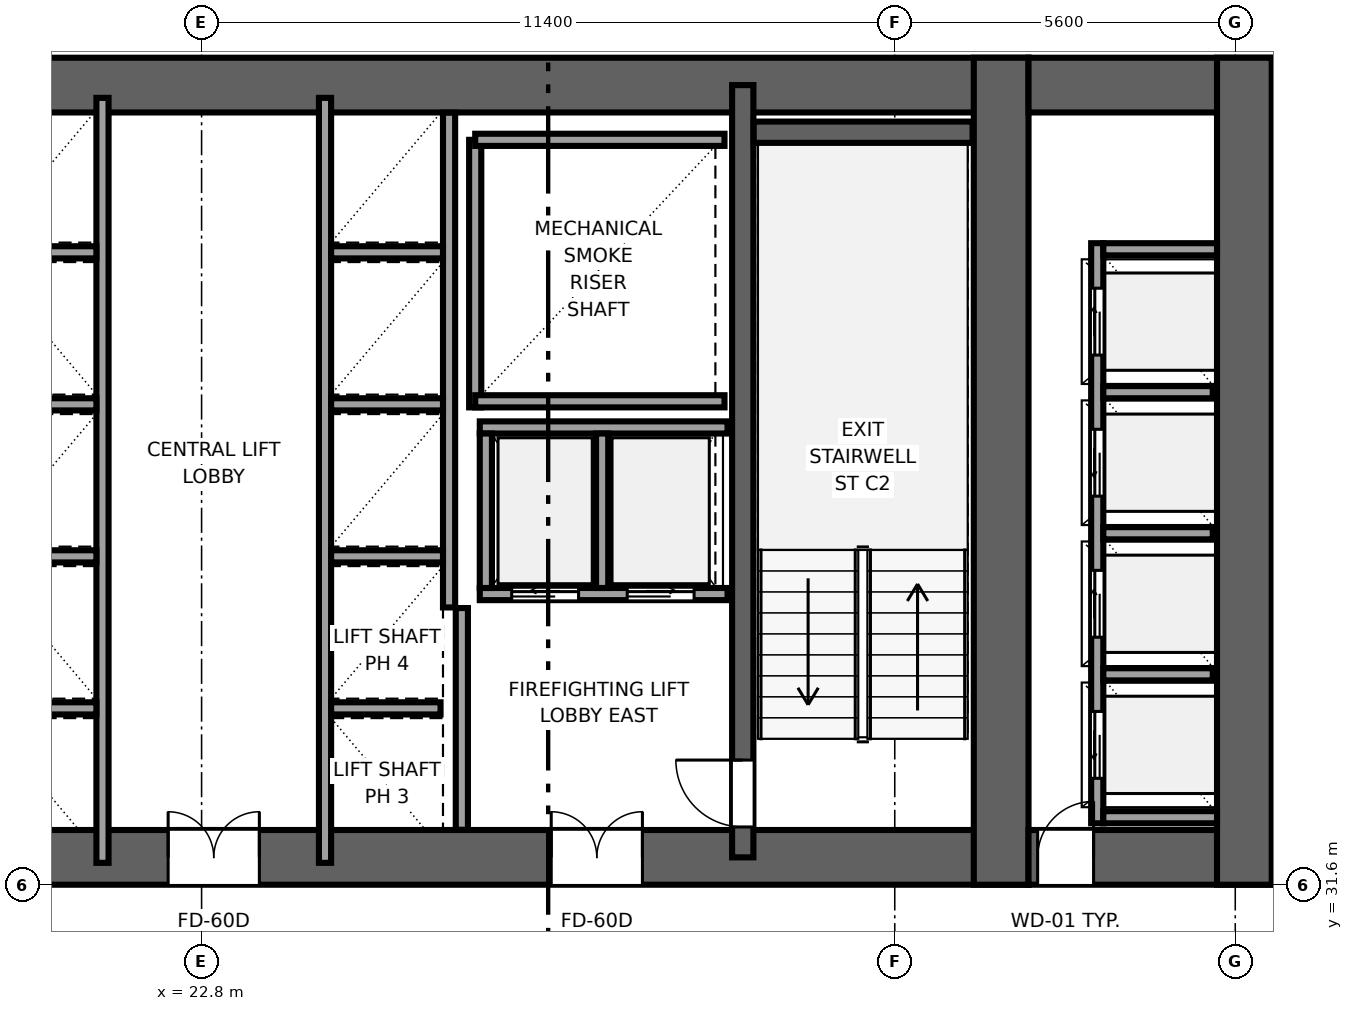
"""IFC4 building model, lengths in metres.
Left out: names, types, materials, properties, quantities, classifications, styles, units other than length and angle.
Written with IfcOpenShell. Run it as: python <this file> out.ifc"""

import sys

from ifc_helpers import new_model, si_unit, direction, frame, frame_2d, origin, place, context, subcontext, project, spatial, rectangle, extrude, source, transform, mapped, element, fill, save


model = new_model("IFC4")
c1 = context("Model", 3, precision=1e-05, world=origin(), true_north=direction((0.0, 1.0)))
c2 = subcontext(c1, "Body", "Model", "MODEL_VIEW")
j1 = project(units=[si_unit("LENGTHUNIT", "METRE"), si_unit("PLANEANGLEUNIT", "RADIAN")], contexts=[c1])
p1 = place(None, origin())
s1 = spatial("IfcSite", under=j1, at=p1, CompositionType="ELEMENT")
p2 = place(p1, origin())
s2 = spatial("IfcBuilding", under=s1, at=p2, CompositionType="ELEMENT")
p3 = place(p2, frame((0.0, 0.0, 56.85)))
s3 = spatial("IfcBuildingStorey", under=s2, at=p3, CompositionType="ELEMENT", Elevation=56.85)
p4 = place(p3, frame((9.6, 32.05, 0.0), z_axis=(0.0, 0.0, 1.0), x_axis=(1.0, 0.0, 0.0)))
e1 = element("IfcWall", 1, at=p4, inside=s3, PredefinedType="SHEAR", context=c2, shape_type="SweptSolid", body=[
    extrude(rectangle(XDim=26.8, YDim=0.9, at=frame_2d((13.4, 0.0))), origin(), (0.0, 0.0, 1.0), 3.55),
])
p5 = place(p4, frame((6.52, 0.0, 0.0), z_axis=(0.0, 0.0, 1.0), x_axis=(-1.0, 0.0, 0.0)))
e2 = element("IfcOpeningElement", 2, at=p5, cuts=e1, PredefinedType="OPENING", context=c2, shape_type="SweptSolid", body=[
    extrude(rectangle(XDim=1.5, YDim=2.04, at=frame_2d((0.75, 1.02))), frame((0.0, 0.46, 0.0), z_axis=(0.0, -1.0, 0.0), x_axis=(1.0, 0.0, 0.0)), (0.0, 0.0, 1.0), 0.92),
])
p6 = place(p4, frame((14.15, 0.0, 0.0), z_axis=(0.0, 0.0, 1.0), x_axis=(-1.0, 0.0, 0.0)))
e3 = element("IfcOpeningElement", 3, at=p6, cuts=e1, PredefinedType="OPENING", context=c2, shape_type="SweptSolid", body=[
    extrude(rectangle(XDim=1.5, YDim=2.04, at=frame_2d((0.75, 1.02))), frame((0.0, 0.46, 0.0), z_axis=(0.0, -1.0, 0.0), x_axis=(1.0, 0.0, 0.0)), (0.0, 0.0, 1.0), 0.92),
])
p7 = place(p4, frame((20.45, 0.0, 0.0), z_axis=(0.0, 0.0, 1.0), x_axis=(-1.0, 0.0, 0.0)))
e4 = element("IfcOpeningElement", 4, at=p7, cuts=e1, PredefinedType="OPENING", context=c2, shape_type="SweptSolid", body=[
    extrude(rectangle(XDim=1.5, YDim=2.04, at=frame_2d((0.75, 1.02))), frame((0.0, 0.46, 0.0), z_axis=(0.0, -1.0, 0.0), x_axis=(1.0, 0.0, 0.0)), (0.0, 0.0, 1.0), 0.92),
])
p8 = place(p4, frame((8.57, 0.0, 0.0), z_axis=(0.0, 0.0, 1.0), x_axis=(-1.0, 0.0, 0.0)))
e5 = element("IfcOpeningElement", 5, at=p8, cuts=e1, PredefinedType="OPENING", context=c2, shape_type="SweptSolid", body=[
    extrude(rectangle(XDim=0.82, YDim=2.01, at=frame_2d((0.41, 1.005))), frame((0.0, 0.46, 0.0), z_axis=(0.0, -1.0, 0.0), x_axis=(1.0, 0.0, 0.0)), (0.0, 0.0, 1.0), 0.92),
])
p9 = place(p3, frame((9.6, 44.75, 0.0), z_axis=(0.0, 0.0, 1.0), x_axis=(1.0, 0.0, 0.0)))
e6 = element("IfcWall", 6, at=p9, inside=s3, PredefinedType="SHEAR", context=c2, shape_type="SweptSolid", body=[
    extrude(rectangle(XDim=26.8, YDim=0.9, at=frame_2d((13.4, 0.0))), origin(), (0.0, 0.0, 1.0), 3.55),
])
p10 = place(p3, frame((35.95, 31.6, 0.0), z_axis=(0.0, 0.0, 1.0), x_axis=(0.0, 1.0, 0.0)))
e7 = element("IfcWall", 7, at=p10, inside=s3, PredefinedType="SHEAR", context=c2, shape_type="SweptSolid", body=[
    extrude(rectangle(XDim=13.6, YDim=0.9, at=frame_2d((6.8, 0.0))), origin(), (0.0, 0.0, 1.0), 3.55),
])
p11 = place(p3, frame((31.7, 32.05, 0.0), z_axis=(0.0, 0.0, 1.0), x_axis=(0.0, 1.0, 0.0)))
e8 = element("IfcWall", 8, at=p11, inside=s3, PredefinedType="SHEAR", context=c2, shape_type="SweptSolid", body=[
    extrude(rectangle(XDim=12.7, YDim=0.35, at=frame_2d((6.35, 0.0))), origin(), (0.0, 0.0, 1.0), 3.55),
])
p12 = place(p11, frame((1.6, 0.0, 0.0), z_axis=(0.0, 0.0, 1.0), x_axis=(-1.0, 0.0, 0.0)))
e9 = element("IfcOpeningElement", 9, at=p12, cuts=e8, PredefinedType="OPENING", context=c2, shape_type="SweptSolid", body=[
    extrude(rectangle(XDim=1.1, YDim=2.12, at=frame_2d((0.55, 1.06))), frame((0.0, 0.185, 0.0), z_axis=(0.0, -1.0, 0.0), x_axis=(1.0, 0.0, 0.0)), (0.0, 0.0, 1.0), 0.37),
])
p13 = place(p3, frame((36.4, 32.05, 0.0), z_axis=(0.0, 0.0, 1.0), x_axis=(1.0, 0.0, 0.0)))
e10 = element("IfcWall", 10, at=p13, inside=s3, PredefinedType="SHEAR", context=c2, shape_type="SweptSolid", body=[
    extrude(rectangle(XDim=4.0, YDim=0.9, at=frame_2d((2.0, 0.0))), origin(), (0.0, 0.0, 1.0), 3.55),
])
p14 = place(p13, frame((1.07, 0.0, 0.0), z_axis=(0.0, 0.0, 1.0), x_axis=(-1.0, 0.0, 0.0)))
e11 = element("IfcOpeningElement", 11, at=p14, cuts=e10, PredefinedType="OPENING", context=c2, shape_type="SweptSolid", body=[
    extrude(rectangle(XDim=0.92, YDim=2.01, at=frame_2d((0.46, 1.005))), frame((0.0, 0.46, 0.0), z_axis=(0.0, -1.0, 0.0), x_axis=(1.0, 0.0, 0.0)), (0.0, 0.0, 1.0), 0.92),
])
p15 = place(p3, frame((36.4, 44.75, 0.0), z_axis=(0.0, 0.0, 1.0), x_axis=(1.0, 0.0, 0.0)))
e12 = element("IfcWall", 12, at=p15, inside=s3, PredefinedType="SHEAR", context=c2, shape_type="SweptSolid", body=[
    extrude(rectangle(XDim=4.0, YDim=0.9, at=frame_2d((2.0, 0.0))), origin(), (0.0, 0.0, 1.0), 3.55),
])
p16 = place(p3, frame((39.95, 31.6, 0.0), z_axis=(0.0, 0.0, 1.0), x_axis=(0.0, 1.0, 0.0)))
e13 = element("IfcWall", 13, at=p16, inside=s3, PredefinedType="SHEAR", context=c2, shape_type="SweptSolid", body=[
    extrude(rectangle(XDim=13.6, YDim=0.9, at=frame_2d((6.8, 0.0))), origin(), (0.0, 0.0, 1.0), 3.55),
])
p17 = place(p3, frame((31.88, 43.975, 0.0), z_axis=(0.0, 0.0, 1.0), x_axis=(1.0, 0.0, 0.0)))
e14 = element("IfcWall", 14, at=p17, inside=s3, PredefinedType="SHEAR", context=c2, shape_type="SweptSolid", body=[
    extrude(rectangle(XDim=3.6, YDim=0.35, at=frame_2d((1.8, 0.0))), origin(), (0.0, 0.0, 1.0), 3.55),
])
p18 = place(p3, frame((27.3, 39.45, 0.0), z_axis=(0.0, 0.0, 1.0), x_axis=(0.0, 1.0, 0.0)))
e15 = element("IfcWall", 15, at=p18, inside=s3, PredefinedType="SOLIDWALL", context=c2, shape_type="SweptSolid", body=[
    extrude(rectangle(XDim=4.4, YDim=0.2, at=frame_2d((2.2, 0.0))), origin(), (0.0, 0.0, 1.0), 3.37),
])
for number, where, z_axis, x_axis in (
    (16, (27.3, 39.55, 0.0), (0.0, 0.0, 1.0), (1.0, 0.0, 0.0)),
    (17, (27.3, 43.85, 0.0), (0.0, 0.0, 1.0), (1.0, 0.0, 0.0)),
):
    element("IfcWall", number, at=place(p3, frame(where, z_axis=z_axis, x_axis=x_axis)), inside=s3, PredefinedType="SOLIDWALL", context=c2, shape_type="SweptSolid", body=[
        extrude(rectangle(XDim=4.1, YDim=0.2, at=frame_2d((2.05, 0.0))), origin(), (0.0, 0.0, 1.0), 3.37),
    ])
p19 = place(p3, frame((27.08, 32.504, 0.0), z_axis=(0.0, 0.0, 1.0), x_axis=(0.0, 1.0, 0.0)))
e18 = element("IfcWall", 18, at=p19, inside=s3, PredefinedType="SOLIDWALL", context=c2, shape_type="SweptSolid", body=[
    extrude(rectangle(XDim=3.646, YDim=0.2, at=frame_2d((1.823, 0.0))), origin(), (0.0, 0.0, 1.0), 3.37),
])
p20 = place(p3, frame((21.17, 31.96, 0.0), z_axis=(0.0, 0.0, 1.0), x_axis=(0.0, 1.0, 0.0)))
e19 = element("IfcWall", 19, at=p20, inside=s3, PredefinedType="SOLIDWALL", context=c2, shape_type="SweptSolid", body=[
    extrude(rectangle(XDim=12.58, YDim=0.2, at=frame_2d((6.29, 0.0))), origin(), (0.0, 0.0, 1.0), 3.37),
])
p21 = place(p3, frame((19.27, 34.5, 0.0), z_axis=(0.0, 0.0, 1.0), x_axis=(1.0, 0.0, 0.0)))
e20 = element("IfcWall", 20, at=p21, inside=s3, PredefinedType="SOLIDWALL", context=c2, shape_type="SweptSolid", body=[
    extrude(rectangle(XDim=1.8, YDim=0.2, at=frame_2d((0.9, 0.0))), origin(), (0.0, 0.0, 1.0), 3.37),
])
for number, where, z_axis, x_axis in (
    (21, (19.23, 37.0, 0.0), (0.0, 0.0, 1.0), (1.0, 0.0, 0.0)),
    (22, (19.23, 39.5, 0.0), (0.0, 0.0, 1.0), (1.0, 0.0, 0.0)),
    (23, (19.23, 42.0, 0.0), (0.0, 0.0, 1.0), (1.0, 0.0, 0.0)),
):
    element("IfcWall", number, at=place(p3, frame(where, z_axis=z_axis, x_axis=x_axis)), inside=s3, PredefinedType="SOLIDWALL", context=c2, shape_type="SweptSolid", body=[
        extrude(rectangle(XDim=1.84, YDim=0.2, at=frame_2d((0.92, 0.0))), origin(), (0.0, 0.0, 1.0), 3.37),
    ])
p22 = place(p3, frame((27.375, 36.38, 0.0), z_axis=(0.0, 0.0, 1.0), x_axis=(1.0, 0.0, 0.0)))
e24 = element("IfcWall", 24, at=p22, inside=s3, PredefinedType="SOLIDWALL", context=c2, shape_type="SweptSolid", body=[
    extrude(rectangle(XDim=4.075, YDim=0.2, at=frame_2d((2.038, 0.0))), origin(), (0.0, 0.0, 1.0), 3.37),
])
p23 = place(p22, frame((0.525, 0.0, 0.0)))
e25 = element("IfcOpeningElement", 25, at=p23, cuts=e24, PredefinedType="OPENING", context=c2, shape_type="SweptSolid", body=[
    extrude(rectangle(XDim=1.1, YDim=2.12, at=frame_2d((0.55, 1.06))), frame((0.0, 0.11, 0.0), z_axis=(0.0, -1.0, 0.0), x_axis=(1.0, 0.0, 0.0)), (0.0, 0.0, 1.0), 0.22),
])
p24 = place(p22, frame((2.425, 0.0, 0.0)))
e26 = element("IfcOpeningElement", 26, at=p24, cuts=e24, PredefinedType="OPENING", context=c2, shape_type="SweptSolid", body=[
    extrude(rectangle(XDim=1.1, YDim=2.12, at=frame_2d((0.55, 1.06))), frame((0.0, 0.11, 0.0), z_axis=(0.0, -1.0, 0.0), x_axis=(1.0, 0.0, 0.0)), (0.0, 0.0, 1.0), 0.22),
])
p25 = place(p3, frame((27.375, 39.12, 0.0), z_axis=(0.0, 0.0, 1.0), x_axis=(1.0, 0.0, 0.0)))
e27 = element("IfcWall", 27, at=p25, inside=s3, PredefinedType="SOLIDWALL", context=c2, shape_type="SweptSolid", body=[
    extrude(rectangle(XDim=4.075, YDim=0.2, at=frame_2d((2.038, 0.0))), origin(), (0.0, 0.0, 1.0), 3.37),
])
for number, where, z_axis, x_axis in (
    (28, (27.475, 36.48, 0.0), (0.0, 0.0, 1.0), (0.0, 1.0, 0.0)),
    (29, (29.387, 36.48, 0.0), (0.0, 0.0, 1.0), (0.0, 1.0, 0.0)),
):
    element("IfcWall", number, at=place(p3, frame(where, z_axis=z_axis, x_axis=x_axis)), inside=s3, PredefinedType="SOLIDWALL", context=c2, shape_type="SweptSolid", body=[
        extrude(rectangle(XDim=2.54, YDim=0.2, at=frame_2d((1.27, 0.0))), origin(), (0.0, 0.0, 1.0), 3.37),
    ])
p26 = place(p3, frame((24.83, 31.96, 0.0), z_axis=(0.0, 0.0, 1.0), x_axis=(0.0, 1.0, 0.0)))
e30 = element("IfcWall", 30, at=p26, inside=s3, PredefinedType="SOLIDWALL", context=c2, shape_type="SweptSolid", body=[
    extrude(rectangle(XDim=12.58, YDim=0.2, at=frame_2d((6.29, 0.0))), origin(), (0.0, 0.0, 1.0), 3.37),
])
p27 = place(p3, frame((26.87, 36.16, 0.0), z_axis=(0.0, 0.0, 1.0), x_axis=(0.0, 1.0, 0.0)))
e31 = element("IfcWall", 31, at=p27, inside=s3, PredefinedType="SOLIDWALL", context=c2, shape_type="SweptSolid", body=[
    extrude(rectangle(XDim=8.136, YDim=0.2, at=frame_2d((4.068, 0.0))), origin(), (0.0, 0.0, 1.0), 3.37),
])
p28 = place(p3, frame((24.93, 34.5, 0.0), z_axis=(0.0, 0.0, 1.0), x_axis=(1.0, 0.0, 0.0)))
e32 = element("IfcWall", 32, at=p28, inside=s3, PredefinedType="SOLIDWALL", context=c2, shape_type="SweptSolid", body=[
    extrude(rectangle(XDim=1.8, YDim=0.2, at=frame_2d((0.9, 0.0))), origin(), (0.0, 0.0, 1.0), 3.37),
])
for number, where, z_axis, x_axis in (
    (33, (24.93, 37.0, 0.0), (0.0, 0.0, 1.0), (1.0, 0.0, 0.0)),
    (34, (24.93, 39.5, 0.0), (0.0, 0.0, 1.0), (1.0, 0.0, 0.0)),
    (35, (24.93, 42.0, 0.0), (0.0, 0.0, 1.0), (1.0, 0.0, 0.0)),
):
    element("IfcWall", number, at=place(p3, frame(where, z_axis=z_axis, x_axis=x_axis)), inside=s3, PredefinedType="SOLIDWALL", context=c2, shape_type="SweptSolid", body=[
        extrude(rectangle(XDim=1.84, YDim=0.2, at=frame_2d((0.92, 0.0))), origin(), (0.0, 0.0, 1.0), 3.37),
    ])
p29 = place(p3, frame((37.53, 32.61, 0.0), z_axis=(0.0, 0.0, 1.0), x_axis=(0.0, 1.0, 0.0)))
e36 = element("IfcWall", 36, at=p29, inside=s3, PredefinedType="SOLIDWALL", context=c2, shape_type="SweptSolid", body=[
    extrude(rectangle(XDim=9.54, YDim=0.2, at=frame_2d((4.77, 0.0))), origin(), (0.0, 0.0, 1.0), 3.37),
])
p30 = place(p29, frame((0.74, 0.0, 0.0)))
e37 = element("IfcOpeningElement", 37, at=p30, cuts=e36, PredefinedType="OPENING", context=c2, shape_type="SweptSolid", body=[
    extrude(rectangle(XDim=1.1, YDim=2.12, at=frame_2d((0.55, 1.06))), frame((0.0, 0.11, 0.0), z_axis=(0.0, -1.0, 0.0), x_axis=(1.0, 0.0, 0.0)), (0.0, 0.0, 1.0), 0.22),
])
p31 = place(p29, frame((3.06, 0.0, 0.0)))
e38 = element("IfcOpeningElement", 38, at=p31, cuts=e36, PredefinedType="OPENING", context=c2, shape_type="SweptSolid", body=[
    extrude(rectangle(XDim=1.1, YDim=2.12, at=frame_2d((0.55, 1.06))), frame((0.0, 0.11, 0.0), z_axis=(0.0, -1.0, 0.0), x_axis=(1.0, 0.0, 0.0)), (0.0, 0.0, 1.0), 0.22),
])
p32 = place(p29, frame((5.38, 0.0, 0.0)))
e39 = element("IfcOpeningElement", 39, at=p32, cuts=e36, PredefinedType="OPENING", context=c2, shape_type="SweptSolid", body=[
    extrude(rectangle(XDim=1.1, YDim=2.12, at=frame_2d((0.55, 1.06))), frame((0.0, 0.11, 0.0), z_axis=(0.0, -1.0, 0.0), x_axis=(1.0, 0.0, 0.0)), (0.0, 0.0, 1.0), 0.22),
])
p33 = place(p29, frame((7.7, 0.0, 0.0)))
e40 = element("IfcOpeningElement", 40, at=p33, cuts=e36, PredefinedType="OPENING", context=c2, shape_type="SweptSolid", body=[
    extrude(rectangle(XDim=1.1, YDim=2.12, at=frame_2d((0.55, 1.06))), frame((0.0, 0.11, 0.0), z_axis=(0.0, -1.0, 0.0), x_axis=(1.0, 0.0, 0.0)), (0.0, 0.0, 1.0), 0.22),
])
for number, where, z_axis, x_axis in (
    (41, (37.63, 32.71, 0.0), (0.0, 0.0, 1.0), (1.0, 0.0, 0.0)),
    (42, (37.63, 42.05, 0.0), (0.0, 0.0, 1.0), (1.0, 0.0, 0.0)),
):
    element("IfcWall", number, at=place(p3, frame(where, z_axis=z_axis, x_axis=x_axis)), inside=s3, PredefinedType="SOLIDWALL", context=c2, shape_type="SweptSolid", body=[
        extrude(rectangle(XDim=1.87, YDim=0.2, at=frame_2d((0.935, 0.0))), origin(), (0.0, 0.0, 1.0), 3.37),
    ])
for number, where, z_axis, x_axis in (
    (43, (37.63, 35.06, 0.0), (0.0, 0.0, 1.0), (1.0, 0.0, 0.0)),
    (44, (37.63, 37.38, 0.0), (0.0, 0.0, 1.0), (1.0, 0.0, 0.0)),
    (45, (37.63, 39.7, 0.0), (0.0, 0.0, 1.0), (1.0, 0.0, 0.0)),
):
    element("IfcWall", number, at=place(p3, frame(where, z_axis=z_axis, x_axis=x_axis)), inside=s3, PredefinedType="SOLIDWALL", context=c2, shape_type="SweptSolid", body=[
        extrude(rectangle(XDim=1.8, YDim=0.2, at=frame_2d((0.9, 0.0))), origin(), (0.0, 0.0, 1.0), 3.37),
    ])
m1 = source(origin(), c2, "Body", "SweptSolid", [
    extrude(rectangle(XDim=1.1, YDim=2.12, at=frame_2d((0.55, 1.06))), frame((0.0, 0.025, 0.0), z_axis=(0.0, -1.0, 0.0), x_axis=(1.0, 0.0, 0.0)), (0.0, 0.0, 1.0), 0.05),
])
p34 = place(p12, origin())
e46 = element("IfcDoor", 46, at=p34, inside=s3, OperationType="SINGLE_SWING_RIGHT", PredefinedType="DOOR", context=c2, shape_type="MappedRepresentation", body=[
    mapped(m1, transform((0.0, 0.0, 0.0), x_axis=(1.0, 0.0, 0.0), y_axis=(0.0, 1.0, 0.0), z_axis=(0.0, 0.0, 1.0), scale=1.0)),
])
fill(e9, e46)
m2 = source(origin(), c2, "Body", "SweptSolid", [
    extrude(rectangle(XDim=1.5, YDim=2.04, at=frame_2d((0.75, 1.02))), frame((0.0, 0.025, 0.0), z_axis=(0.0, -1.0, 0.0), x_axis=(1.0, 0.0, 0.0)), (0.0, 0.0, 1.0), 0.05),
])
p35 = place(p6, origin())
e47 = element("IfcDoor", 47, at=p35, inside=s3, OperationType="DOUBLE_DOOR_SINGLE_SWING", PredefinedType="DOOR", context=c2, shape_type="MappedRepresentation", body=[
    mapped(m2, transform((0.0, 0.0, 0.0), x_axis=(1.0, 0.0, 0.0), y_axis=(0.0, 1.0, 0.0), z_axis=(0.0, 0.0, 1.0), scale=1.0)),
])
fill(e3, e47)
p36 = place(p7, origin())
e48 = element("IfcDoor", 48, at=p36, inside=s3, OperationType="DOUBLE_DOOR_SINGLE_SWING", PredefinedType="DOOR", context=c2, shape_type="MappedRepresentation", body=[
    mapped(m2, transform((0.0, 0.0, 0.0), x_axis=(1.0, 0.0, 0.0), y_axis=(0.0, 1.0, 0.0), z_axis=(0.0, 0.0, 1.0), scale=1.0)),
])
fill(e4, e48)
m3 = source(origin(), c2, "Body", "SweptSolid", [
    extrude(rectangle(XDim=0.92, YDim=2.01, at=frame_2d((0.46, 1.005))), frame((0.0, 0.025, 0.0), z_axis=(0.0, -1.0, 0.0), x_axis=(1.0, 0.0, 0.0)), (0.0, 0.0, 1.0), 0.05),
])
p37 = place(p14, origin())
e49 = element("IfcDoor", 49, at=p37, inside=s3, OperationType="SINGLE_SWING_RIGHT", PredefinedType="DOOR", context=c2, shape_type="MappedRepresentation", body=[
    mapped(m3, transform((0.0, 0.0, 0.0), x_axis=(1.0, 0.0, 0.0), y_axis=(0.0, 1.0, 0.0), z_axis=(0.0, 0.0, 1.0), scale=1.0)),
])
fill(e11, e49)
m4 = source(origin(), c2, "Body", "SweptSolid", [
    extrude(rectangle(XDim=1.1, YDim=2.12, at=frame_2d((0.55, 1.06))), frame((0.0, 0.025, 0.0), z_axis=(0.0, -1.0, 0.0), x_axis=(1.0, 0.0, 0.0)), (0.0, 0.0, 1.0), 0.05),
])
p38 = place(p23, origin())
e50 = element("IfcDoor", 50, at=p38, inside=s3, OperationType="SLIDING_TO_LEFT", PredefinedType="DOOR", context=c2, shape_type="MappedRepresentation", body=[
    mapped(m4, transform((0.0, 0.0, 0.0), x_axis=(1.0, 0.0, 0.0), y_axis=(0.0, 1.0, 0.0), z_axis=(0.0, 0.0, 1.0), scale=1.0)),
])
fill(e25, e50)
p39 = place(p24, origin())
e51 = element("IfcDoor", 51, at=p39, inside=s3, OperationType="SLIDING_TO_RIGHT", PredefinedType="DOOR", context=c2, shape_type="MappedRepresentation", body=[
    mapped(m4, transform((0.0, 0.0, 0.0), x_axis=(1.0, 0.0, 0.0), y_axis=(0.0, 1.0, 0.0), z_axis=(0.0, 0.0, 1.0), scale=1.0)),
])
fill(e26, e51)
p40 = place(p30, origin())
e52 = element("IfcDoor", 52, at=p40, inside=s3, OperationType="SLIDING_TO_LEFT", PredefinedType="DOOR", context=c2, shape_type="MappedRepresentation", body=[
    mapped(m4, transform((0.0, 0.0, 0.0), x_axis=(1.0, 0.0, 0.0), y_axis=(0.0, 1.0, 0.0), z_axis=(0.0, 0.0, 1.0), scale=1.0)),
])
fill(e37, e52)
p41 = place(p31, origin())
e53 = element("IfcDoor", 53, at=p41, inside=s3, OperationType="SLIDING_TO_RIGHT", PredefinedType="DOOR", context=c2, shape_type="MappedRepresentation", body=[
    mapped(m4, transform((0.0, 0.0, 0.0), x_axis=(1.0, 0.0, 0.0), y_axis=(0.0, 1.0, 0.0), z_axis=(0.0, 0.0, 1.0), scale=1.0)),
])
fill(e38, e53)
p42 = place(p32, origin())
e54 = element("IfcDoor", 54, at=p42, inside=s3, OperationType="SLIDING_TO_LEFT", PredefinedType="DOOR", context=c2, shape_type="MappedRepresentation", body=[
    mapped(m4, transform((0.0, 0.0, 0.0), x_axis=(1.0, 0.0, 0.0), y_axis=(0.0, 1.0, 0.0), z_axis=(0.0, 0.0, 1.0), scale=1.0)),
])
fill(e39, e54)
p43 = place(p33, origin())
e55 = element("IfcDoor", 55, at=p43, inside=s3, OperationType="SLIDING_TO_RIGHT", PredefinedType="DOOR", context=c2, shape_type="MappedRepresentation", body=[
    mapped(m4, transform((0.0, 0.0, 0.0), x_axis=(1.0, 0.0, 0.0), y_axis=(0.0, 1.0, 0.0), z_axis=(0.0, 0.0, 1.0), scale=1.0)),
])
fill(e40, e55)
save(model, sys.argv[1])
